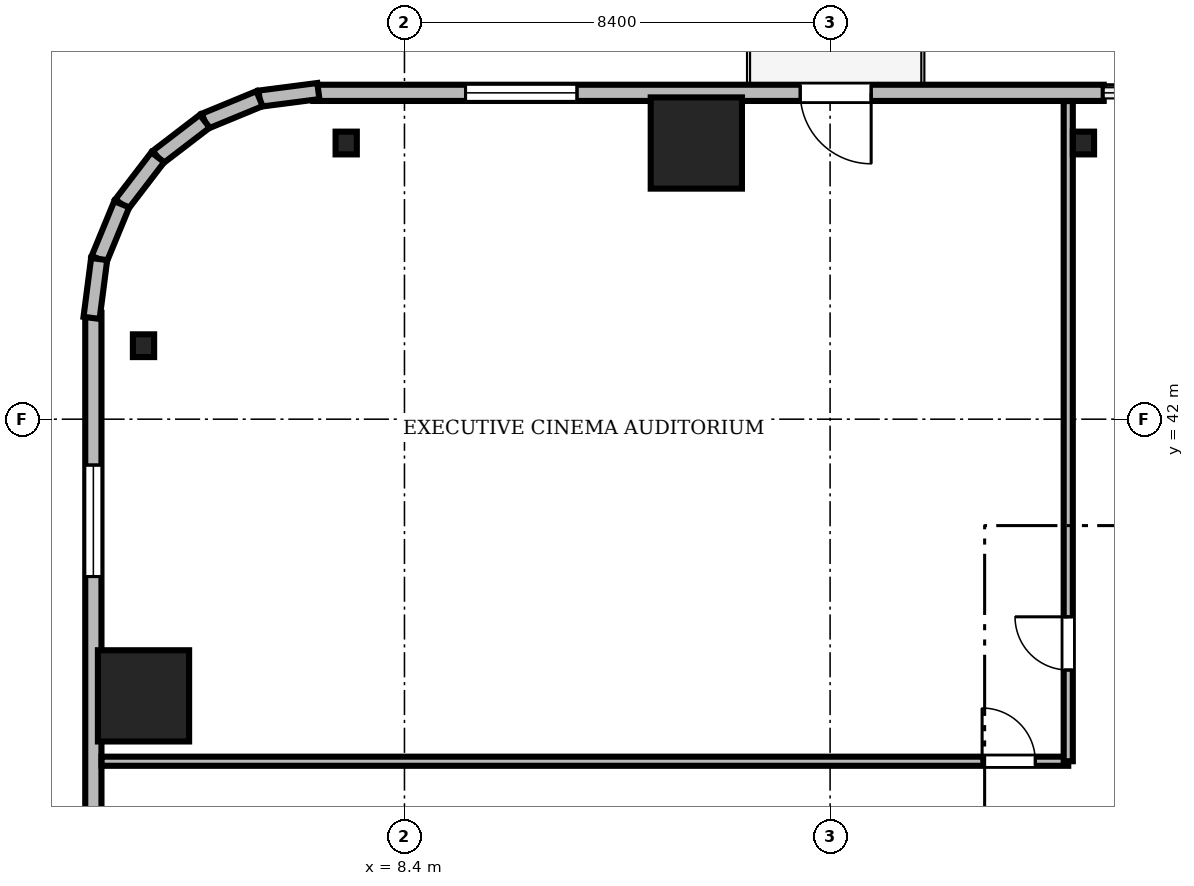
"""IFC4 building model, lengths in metres.
Left out: names, types, materials, properties, quantities, classifications, styles, units other than length and angle.
Written with IfcOpenShell. Run it as: python <this file> out.ifc"""

import sys

from ifc_helpers import new_model, si_unit, direction, frame, frame_2d, origin, origin_2d, place, context, subcontext, project, spatial, rectangle, i_section, extrude, source, transform, mapped, element, fill, save


model = new_model("IFC4")
c1 = context("Model", 3, precision=1e-05, world=origin(), true_north=direction((0.0, 1.0)))
c2 = subcontext(c1, "Body", "Model", "MODEL_VIEW")
j1 = project(units=[si_unit("LENGTHUNIT", "METRE"), si_unit("PLANEANGLEUNIT", "RADIAN")], contexts=[c1])
p1 = place(None, origin())
s1 = spatial("IfcSite", under=j1, at=p1, CompositionType="ELEMENT")
p2 = place(p1, origin())
s2 = spatial("IfcBuilding", under=s1, at=p2, CompositionType="ELEMENT")
p3 = place(p2, frame((0.0, 0.0, 60.45)))
s3 = spatial("IfcBuildingStorey", under=s2, at=p3, CompositionType="ELEMENT", Elevation=60.45)
m1 = source(origin(), c2, "Body", "SweptSolid", [
    extrude(rectangle(XDim=1.8, YDim=1.8, at=origin_2d()), origin(), (0.0, 0.0, 1.0), 3.41),
])
for number, where, z_axis, x_axis in (
    (1, (14.16, 47.45, 0.0), (0.0, 0.0, 1.0), (1.0, 0.0, 0.0)),
    (2, (3.25, 36.54, 0.0), (0.0, 0.0, 1.0), (1.0, 0.0, 0.0)),
):
    element("IfcColumn", number, at=place(p3, frame(where, z_axis=z_axis, x_axis=x_axis)), inside=s3, PredefinedType="COLUMN", context=c2, shape_type="MappedRepresentation", body=[
        mapped(m1, transform((0.0, 0.0, 0.0), scale=1.0)),
    ])
m2 = source(origin(), c2, "Body", "SweptSolid", [
    extrude(i_section(OverallWidth=0.419, OverallDepth=0.449, WebThickness=0.031, FlangeThickness=0.048, FilletRadius=0.015, at=origin_2d()), origin(), (0.0, 0.0, 1.0), 3.41),
])
for number, where, z_axis, x_axis in (
    (3, (21.8, 47.45, 0.0), (0.0, 0.0, 1.0), (1.0, 0.0, 0.0)),
    (4, (7.25, 47.45, 0.0), (0.0, 0.0, 1.0), (1.0, 0.0, 0.0)),
    (5, (3.25, 43.45, 0.0), (0.0, 0.0, 1.0), (1.0, 0.0, 0.0)),
):
    element("IfcColumn", number, at=place(p3, frame(where, z_axis=z_axis, x_axis=x_axis)), inside=s3, PredefinedType="COLUMN", context=c2, shape_type="MappedRepresentation", body=[
        mapped(m2, transform((0.0, 0.0, 0.0), scale=1.0)),
    ])
m3 = source(origin(), c2, "Body", "SweptSolid", [
    extrude(rectangle(XDim=15.6, YDim=0.32, at=frame_2d((7.8, 0.0))), origin(), (0.0, 0.0, 1.0), 3.41),
])
p4 = place(p3, frame((22.2, 48.44, 0.0), z_axis=(0.0, 0.0, 1.0), x_axis=(-1.0, 0.0, 0.0)))
e6 = element("IfcWall", 6, at=p4, inside=s3, PredefinedType="SOLIDWALL", context=c2, shape_type="MappedRepresentation", body=[
    mapped(m3, transform((0.0, 0.0, 0.0), scale=1.0)),
])
m4 = source(origin(), c2, "Body", "SweptSolid", [
    extrude(rectangle(XDim=1.4, YDim=2.3, at=frame_2d((0.7, 1.15))), frame((0.0, 0.17, 0.0), z_axis=(0.0, -1.0, 0.0), x_axis=(1.0, 0.0, 0.0)), (0.0, 0.0, 1.0), 0.34),
])
p5 = place(p4, frame((4.59, 0.0, 0.0)))
e7 = element("IfcOpeningElement", 7, at=p5, cuts=e6, PredefinedType="OPENING", context=c2, shape_type="MappedRepresentation", body=[
    mapped(m4, transform((0.0, 0.0, 0.0), scale=1.0)),
])
m5 = source(origin(), c2, "Body", "SweptSolid", [
    extrude(rectangle(XDim=2.2, YDim=2.4, at=frame_2d((1.1, 1.2))), frame((0.0, 0.17, 0.0), z_axis=(0.0, -1.0, 0.0), x_axis=(1.0, 0.0, 0.0)), (0.0, 0.0, 1.0), 0.34),
])
p6 = place(p4, frame((10.395, 0.0, 0.72)))
e8 = element("IfcOpeningElement", 8, at=p6, cuts=e6, PredefinedType="OPENING", context=c2, shape_type="MappedRepresentation", body=[
    mapped(m5, transform((0.0, 0.0, 0.0), scale=1.0)),
])
m6 = source(origin(), c2, "Body", "SweptSolid", [
    extrude(rectangle(XDim=15.6, YDim=0.32, at=frame_2d((7.8, 0.0))), origin(), (0.0, 0.0, 1.0), 3.41),
])
p7 = place(p3, frame((2.26, 44.1, 0.0), z_axis=(0.0, 0.0, 1.0), x_axis=(0.0, -1.0, 0.0)))
e9 = element("IfcWall", 9, at=p7, inside=s3, PredefinedType="SOLIDWALL", context=c2, shape_type="MappedRepresentation", body=[
    mapped(m6, transform((0.0, 0.0, 0.0), scale=1.0)),
])
p8 = place(p7, frame((3.005, 0.0, 0.72)))
e10 = element("IfcOpeningElement", 10, at=p8, cuts=e9, PredefinedType="OPENING", context=c2, shape_type="MappedRepresentation", body=[
    mapped(m5, transform((0.0, 0.0, 0.0), scale=1.0)),
])
m7 = source(origin(), c2, "Body", "SweptSolid", [
    extrude(rectangle(XDim=1.17, YDim=0.32, at=frame_2d((0.585, 0.0))), origin(), (0.0, 0.0, 1.0), 3.41),
])
p9 = place(p3, frame((6.7, 48.476, 0.0), z_axis=(0.0, 0.0, 1.0), x_axis=(-0.991735963317, -0.128295670475, 0.0)))
e11 = element("IfcWall", 11, at=p9, inside=s3, PredefinedType="SOLIDWALL", context=c2, shape_type="MappedRepresentation", body=[
    mapped(m7, transform((0.0, 0.0, 0.0), scale=1.0)),
])
m8 = source(origin(), c2, "Body", "SweptSolid", [
    extrude(rectangle(XDim=1.169, YDim=0.32, at=frame_2d((0.584, 0.0))), origin(), (0.0, 0.0, 1.0), 3.41),
])
p10 = place(p3, frame((5.54, 48.325, 0.0), z_axis=(0.0, 0.0, 1.0), x_axis=(-0.924552646638, -0.381054331552, 0.0)))
e12 = element("IfcWall", 12, at=p10, inside=s3, PredefinedType="SOLIDWALL", context=c2, shape_type="MappedRepresentation", body=[
    mapped(m8, transform((0.0, 0.0, 0.0), scale=1.0)),
])
m9 = source(origin(), c2, "Body", "SweptSolid", [
    extrude(rectangle(XDim=1.169, YDim=0.32, at=frame_2d((0.584, 0.0))), origin(), (0.0, 0.0, 1.0), 3.41),
])
p11 = place(p3, frame((4.459, 47.88, 0.0), z_axis=(0.0, 0.0, 1.0), x_axis=(-0.793663520347, -0.608356981114, 0.0)))
e13 = element("IfcWall", 13, at=p11, inside=s3, PredefinedType="SOLIDWALL", context=c2, shape_type="MappedRepresentation", body=[
    mapped(m9, transform((0.0, 0.0, 0.0), scale=1.0)),
])
m10 = source(origin(), c2, "Body", "SweptSolid", [
    extrude(rectangle(XDim=1.169, YDim=0.32, at=frame_2d((0.584, 0.0))), origin(), (0.0, 0.0, 1.0), 3.41),
])
p12 = place(p3, frame((3.531, 47.169, 0.0), z_axis=(0.0, 0.0, 1.0), x_axis=(-0.608387696831, -0.793639975269, 0.0)))
e14 = element("IfcWall", 14, at=p12, inside=s3, PredefinedType="SOLIDWALL", context=c2, shape_type="MappedRepresentation", body=[
    mapped(m10, transform((0.0, 0.0, 0.0), scale=1.0)),
])
p13 = place(p3, frame((2.82, 46.241, 0.0), z_axis=(0.0, 0.0, 1.0), x_axis=(-0.381054331552, -0.924552646638, 0.0)))
e15 = element("IfcWall", 15, at=p13, inside=s3, PredefinedType="SOLIDWALL", context=c2, shape_type="MappedRepresentation", body=[
    mapped(m8, transform((0.0, 0.0, 0.0), scale=1.0)),
])
p14 = place(p3, frame((2.375, 45.16, 0.0), z_axis=(0.0, 0.0, 1.0), x_axis=(-0.128295670475, -0.991735963317, 0.0)))
e16 = element("IfcWall", 16, at=p14, inside=s3, PredefinedType="SOLIDWALL", context=c2, shape_type="MappedRepresentation", body=[
    mapped(m7, transform((0.0, 0.0, 0.0), scale=1.0)),
])
m11 = source(origin(), c2, "Body", "SweptSolid", [
    extrude(rectangle(XDim=19.078, YDim=0.18, at=frame_2d((9.539, 0.0))), origin(), (0.0, 0.0, 1.0), 2.652),
])
p15 = place(p3, frame((2.422, 35.25, 0.0), z_axis=(0.0, 0.0, 1.0), x_axis=(1.0, 0.0, 0.0)))
e17 = element("IfcWall", 17, at=p15, inside=s3, PredefinedType="PARTITIONING", context=c2, shape_type="MappedRepresentation", body=[
    mapped(m11, transform((0.0, 0.0, 0.0), scale=1.0)),
])
m12 = source(origin(), c2, "Body", "SweptSolid", [
    extrude(rectangle(XDim=1.05, YDim=2.2, at=frame_2d((0.525, 1.1))), frame((0.0, 0.1, 0.0), z_axis=(0.0, -1.0, 0.0), x_axis=(1.0, 0.0, 0.0)), (0.0, 0.0, 1.0), 0.2),
])
p16 = place(p15, frame((17.378, 0.0, 0.0)))
e18 = element("IfcOpeningElement", 18, at=p16, cuts=e17, PredefinedType="OPENING", context=c2, shape_type="MappedRepresentation", body=[
    mapped(m12, transform((0.0, 0.0, 0.0), scale=1.0)),
])
m13 = source(origin(), c2, "Body", "SweptSolid", [
    extrude(rectangle(XDim=13.028, YDim=0.18, at=frame_2d((6.514, 0.0))), origin(), (0.0, 0.0, 1.0), 2.652),
])
p17 = place(p3, frame((21.5, 35.25, 0.0), z_axis=(0.0, 0.0, 1.0), x_axis=(0.0, 1.0, 0.0)))
e19 = element("IfcWall", 19, at=p17, inside=s3, PredefinedType="PARTITIONING", context=c2, shape_type="MappedRepresentation", body=[
    mapped(m13, transform((0.0, 0.0, 0.0), scale=1.0)),
])
p18 = place(p17, frame((1.8, 0.0, 0.0)))
e20 = element("IfcOpeningElement", 20, at=p18, cuts=e19, PredefinedType="OPENING", context=c2, shape_type="MappedRepresentation", body=[
    mapped(m12, transform((0.0, 0.0, 0.0), scale=1.0)),
])
m14 = source(origin(), c2, "Body", "SweptSolid", [
    extrude(rectangle(XDim=1.4, YDim=2.3, at=frame_2d((0.7, 1.15))), frame((0.0, 0.025, 0.0), z_axis=(0.0, -1.0, 0.0), x_axis=(1.0, 0.0, 0.0)), (0.0, 0.0, 1.0), 0.05),
])
p19 = place(p5, frame((1.4, 0.0, 0.0), z_axis=(0.0, 0.0, 1.0), x_axis=(-1.0, 0.0, 0.0)))
e21 = element("IfcDoor", 21, at=p19, inside=s3, OperationType="DOUBLE_DOOR_SLIDING", PredefinedType="DOOR", context=c2, shape_type="MappedRepresentation", body=[
    mapped(m14, transform((0.0, 0.0, 0.0), scale=1.0)),
])
fill(e7, e21)
m15 = source(origin(), c2, "Body", "SweptSolid", [
    extrude(rectangle(XDim=2.2, YDim=2.4, at=frame_2d((1.1, 1.2))), frame((0.0, 0.03, 0.0), z_axis=(0.0, -1.0, 0.0), x_axis=(1.0, 0.0, 0.0)), (0.0, 0.0, 1.0), 0.06),
])
p20 = place(p6, origin())
e22 = element("IfcWindow", 22, at=p20, inside=s3, PartitioningType="SINGLE_PANEL", PredefinedType="WINDOW", context=c2, shape_type="MappedRepresentation", body=[
    mapped(m15, transform((0.0, 0.0, 0.0), scale=1.0)),
])
fill(e8, e22)
p21 = place(p8, origin())
e23 = element("IfcWindow", 23, at=p21, inside=s3, PartitioningType="SINGLE_PANEL", PredefinedType="WINDOW", context=c2, shape_type="MappedRepresentation", body=[
    mapped(m15, transform((0.0, 0.0, 0.0), scale=1.0)),
])
fill(e10, e23)
m16 = source(origin(), c2, "Body", "SweptSolid", [
    extrude(rectangle(XDim=1.05, YDim=2.2, at=frame_2d((0.525, 1.1))), frame((0.0, 0.025, 0.0), z_axis=(0.0, -1.0, 0.0), x_axis=(1.0, 0.0, 0.0)), (0.0, 0.0, 1.0), 0.05),
])
p22 = place(p16, origin())
e24 = element("IfcDoor", 24, at=p22, inside=s3, OperationType="SINGLE_SWING_LEFT", PredefinedType="DOOR", context=c2, shape_type="MappedRepresentation", body=[
    mapped(m16, transform((0.0, 0.0, 0.0), scale=1.0)),
])
fill(e18, e24)
p23 = place(p18, origin())
e25 = element("IfcDoor", 25, at=p23, inside=s3, OperationType="SINGLE_SWING_RIGHT", PredefinedType="DOOR", context=c2, shape_type="MappedRepresentation", body=[
    mapped(m16, transform((0.0, 0.0, 0.0), scale=1.0)),
])
fill(e20, e25)
save(model, sys.argv[1])
